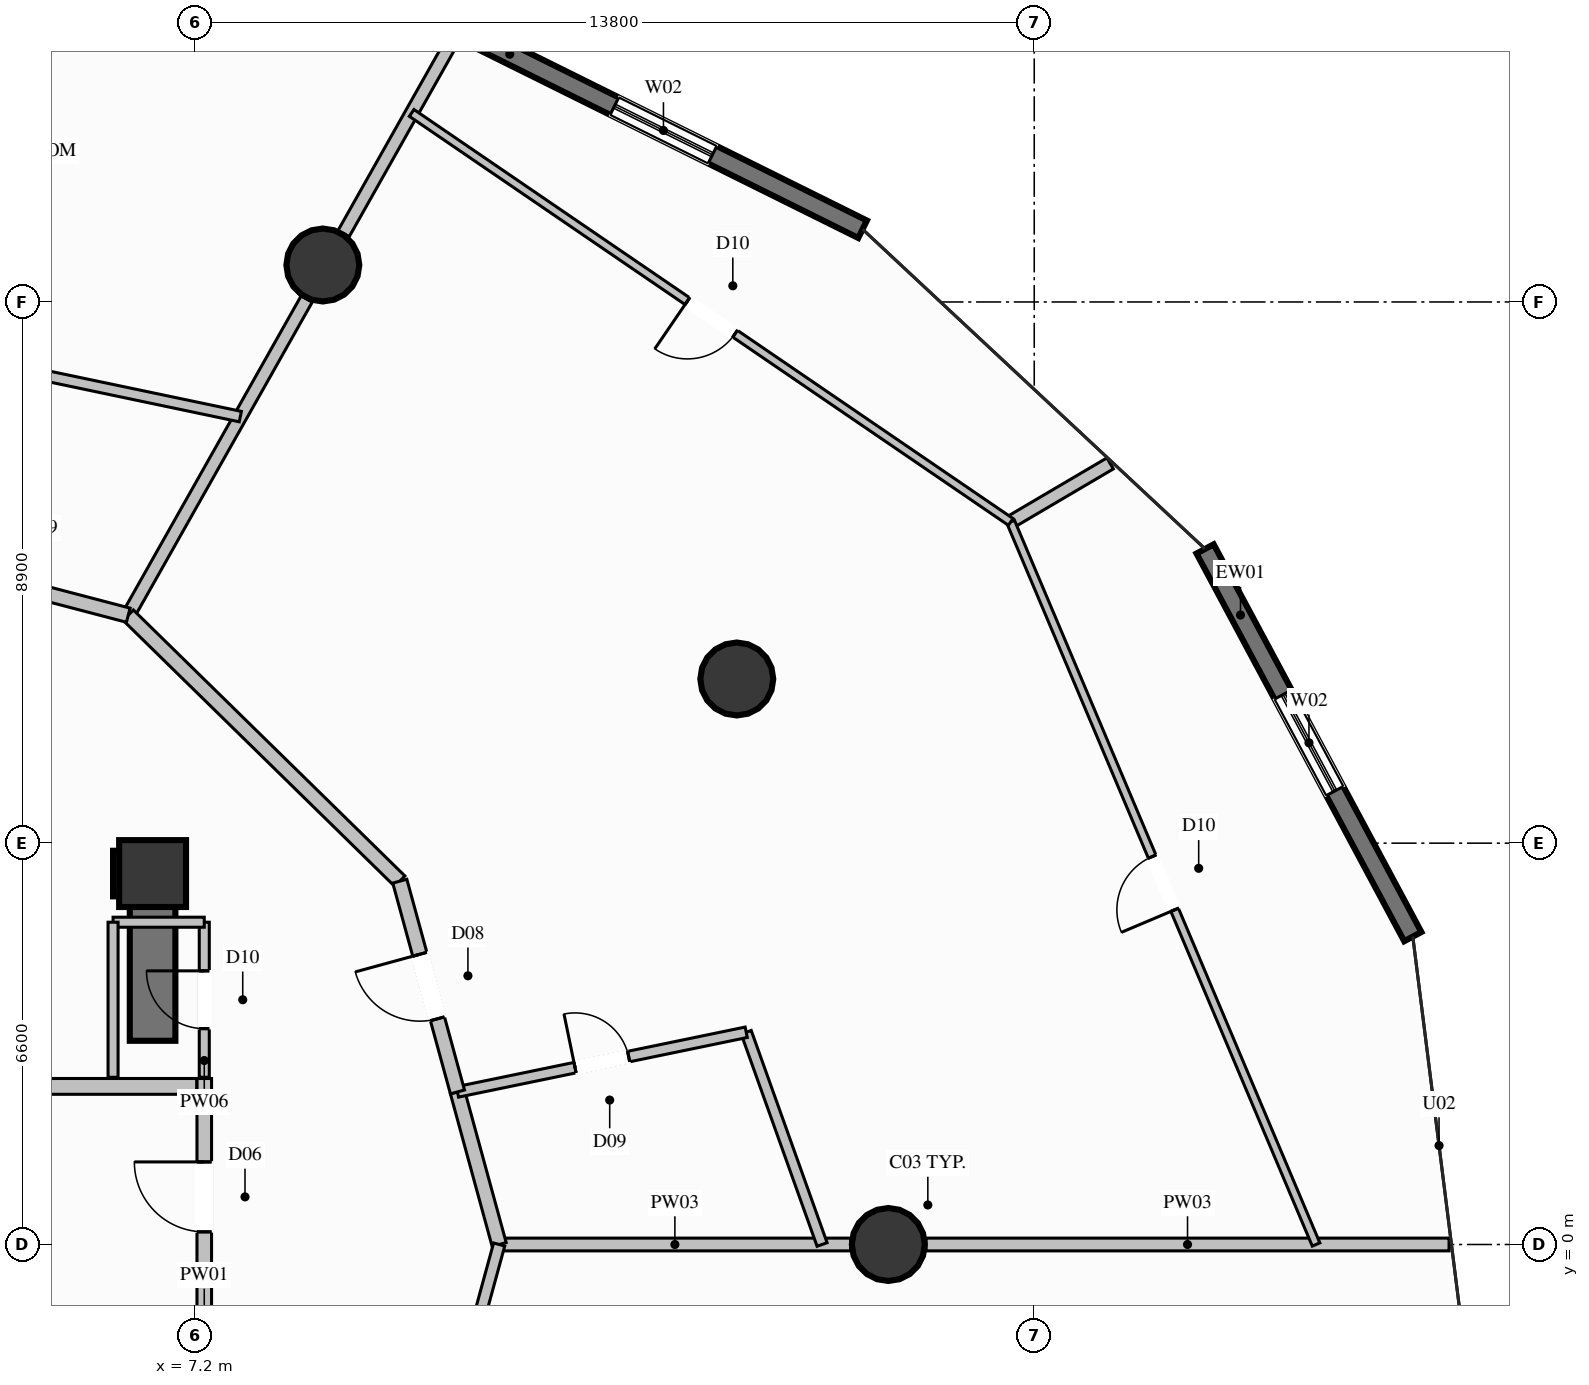
"""IFC4 building model, lengths in metres.
Left out: names, types, materials, properties, quantities, classifications, styles, units other than length and angle.
Written with IfcOpenShell. Run it as: python <this file> out.ifc"""

import sys

from ifc_helpers import new_model, si_unit, direction, frame, frame_2d, origin, origin_2d, place, context, subcontext, project, spatial, rectangle, circle, extrude, element, fill, save


model = new_model("IFC4")
c1 = context("Model", 3, precision=1e-05, world=origin(), true_north=direction((0.0, 1.0)))
c2 = subcontext(c1, "Body", "Model", "MODEL_VIEW")
j1 = project(units=[si_unit("LENGTHUNIT", "METRE"), si_unit("PLANEANGLEUNIT", "RADIAN")], contexts=[c1])
p1 = place(None, origin())
s1 = spatial("IfcSite", under=j1, at=p1, CompositionType="ELEMENT")
p2 = place(p1, origin())
s2 = spatial("IfcBuilding", under=s1, at=p2, CompositionType="ELEMENT")
p3 = place(p2, frame((0.0, 0.0, 32.0)))
s3 = spatial("IfcBuildingStorey", under=s2, at=p3, CompositionType="ELEMENT", Elevation=32.0)
p4 = place(p3, frame((6.5, 6.1, 0.0), z_axis=(0.0, 0.0, 1.0), x_axis=(1.0, 0.0, 0.0)))
e1 = element("IfcColumn", 1, at=p4, inside=s3, PredefinedType="COLUMN", context=c2, shape_type="SweptSolid", body=[
    extrude(rectangle(XDim=1.1, YDim=1.1, at=origin_2d()), origin(), (0.0, 0.0, 1.0), 3.6),
])
p5 = place(p3, frame((5.85, 6.1, 0.0), z_axis=(0.0, 0.0, 1.0), x_axis=(1.0, 0.0, 0.0)))
e2 = element("IfcWall", 2, at=p5, inside=s3, PredefinedType="SHEAR", context=c2, shape_type="SweptSolid", body=[
    extrude(rectangle(XDim=0.275, YDim=0.75, at=frame_2d((0.137, 0.0))), origin(), (0.0, 0.0, 1.0), 3.6),
])
p6 = place(p3, frame((6.5, 3.35, 0.0), z_axis=(0.0, 0.0, 1.0), x_axis=(0.0, 1.0, 0.0)))
e3 = element("IfcWall", 3, at=p6, inside=s3, PredefinedType="SHEAR", context=c2, shape_type="SweptSolid", body=[
    extrude(rectangle(XDim=3.125, YDim=0.75, at=frame_2d((1.562, 0.0))), origin(), (0.0, 0.0, 1.0), 3.6),
])
for number, where, z_axis, x_axis in (
    (4, (18.6, 0.0, 0.0), (0.0, 0.0, 1.0), (1.0, 0.0, 0.0)),
    (5, (16.108, 9.3, 0.0), (0.0, 0.0, 1.0), (1.0, 0.0, 0.0)),
    (6, (9.3, 16.108, 0.0), (0.0, 0.0, 1.0), (1.0, 0.0, 0.0)),
):
    element("IfcColumn", number, at=place(p3, frame(where, z_axis=z_axis, x_axis=x_axis)), inside=s3, PredefinedType="COLUMN", context=c2, shape_type="SweptSolid", body=[
        extrude(circle(Radius=0.6, at=origin_2d()), origin(), (0.0, 0.0, 1.0), 3.6),
    ])
p7 = place(p3, frame((23.81, 11.439, 0.0), z_axis=(0.0, 0.0, 1.0), x_axis=(0.472255130515, -0.881461905985, 0.0)))
e7 = element("IfcWall", 7, at=p7, inside=s3, PredefinedType="SOLIDWALL", context=c2, shape_type="SweptSolid", body=[
    extrude(rectangle(XDim=7.233, YDim=0.32, at=frame_2d((3.617, 0.0))), origin(), (0.0, 0.0, 1.0), 3.34),
])
p8 = place(p7, frame((2.717, 0.0, 0.35)))
e8 = element("IfcOpeningElement", 8, at=p8, cuts=e7, PredefinedType="OPENING", context=c2, shape_type="SweptSolid", body=[
    extrude(rectangle(XDim=1.8, YDim=2.6, at=frame_2d((0.9, 1.3))), frame((0.0, 0.17, 0.0), z_axis=(0.0, -1.0, 0.0), x_axis=(1.0, 0.0, 0.0)), (0.0, 0.0, 1.0), 0.34),
])
p9 = place(p3, frame((10.876, 20.318, 0.0), z_axis=(0.0, 0.0, 1.0), x_axis=(0.895818759339, -0.444419565743, 0.0)))
e9 = element("IfcWall", 9, at=p9, inside=s3, PredefinedType="SOLIDWALL", context=c2, shape_type="SweptSolid", body=[
    extrude(rectangle(XDim=8.15, YDim=0.32, at=frame_2d((4.075, 0.0))), origin(), (0.0, 0.0, 1.0), 3.34),
])
p10 = place(p9, frame((3.594, 0.0, 0.35)))
e10 = element("IfcOpeningElement", 10, at=p10, cuts=e9, PredefinedType="OPENING", context=c2, shape_type="SweptSolid", body=[
    extrude(rectangle(XDim=1.8, YDim=2.6, at=frame_2d((0.9, 1.3))), frame((0.0, 0.17, 0.0), z_axis=(0.0, -1.0, 0.0), x_axis=(1.0, 0.0, 0.0)), (0.0, 0.0, 1.0), 0.34),
])
p11 = place(p3, frame((7.35, -2.34, 0.0), z_axis=(0.0, 0.0, 1.0), x_axis=(0.0, 1.0, 0.0)))
e11 = element("IfcWall", 11, at=p11, inside=s3, PredefinedType="PARTITIONING", context=c2, shape_type="SweptSolid", body=[
    extrude(rectangle(XDim=5.07, YDim=0.24, at=frame_2d((2.535, 0.0))), origin(), (0.0, 0.0, 1.0), 2.425),
])
p12 = place(p11, frame((2.548, 0.0, 0.0)))
e12 = element("IfcOpeningElement", 12, at=p12, cuts=e11, PredefinedType="OPENING", context=c2, shape_type="SweptSolid", body=[
    extrude(rectangle(XDim=1.15, YDim=2.2, at=frame_2d((0.575, 1.1))), frame((0.0, 0.13, 0.0), z_axis=(0.0, -1.0, 0.0), x_axis=(1.0, 0.0, 0.0)), (0.0, 0.0, 1.0), 0.26),
])
p13 = place(p3, frame((4.13, 2.6, 0.0), z_axis=(0.0, 0.0, 1.0), x_axis=(1.0, 0.0, 0.0)))
e13 = element("IfcWall", 13, at=p13, inside=s3, PredefinedType="PARTITIONING", context=c2, shape_type="SweptSolid", body=[
    extrude(rectangle(XDim=3.095, YDim=0.26, at=frame_2d((1.548, 0.0))), origin(), (0.0, 0.0, 1.0), 3.34),
])
p14 = place(p3, frame((7.35, 2.75, 0.0), z_axis=(0.0, 0.0, 1.0), x_axis=(0.0, 1.0, 0.0)))
e14 = element("IfcWall", 14, at=p14, inside=s3, PredefinedType="PARTITIONING", context=c2, shape_type="SweptSolid", body=[
    extrude(rectangle(XDim=2.55, YDim=0.165, at=frame_2d((1.275, 0.0))), origin(), (0.0, 0.0, 1.0), 3.34),
])
p15 = place(p14, frame((0.8, 0.0, 0.0)))
e15 = element("IfcOpeningElement", 15, at=p15, cuts=e14, PredefinedType="OPENING", context=c2, shape_type="SweptSolid", body=[
    extrude(rectangle(XDim=0.95, YDim=2.1, at=frame_2d((0.475, 1.05))), frame((0.0, 0.093, 0.0), z_axis=(0.0, -1.0, 0.0), x_axis=(1.0, 0.0, 0.0)), (0.0, 0.0, 1.0), 0.185),
])
p16 = place(p3, frame((7.35, 5.3, 0.0), z_axis=(0.0, 0.0, 1.0), x_axis=(-1.0, 0.0, 0.0)))
e16 = element("IfcWall", 16, at=p16, inside=s3, PredefinedType="PARTITIONING", context=c2, shape_type="SweptSolid", body=[
    extrude(rectangle(XDim=1.5, YDim=0.165, at=frame_2d((0.75, 0.0))), origin(), (0.0, 0.0, 1.0), 2.425),
])
p17 = place(p3, frame((5.85, 5.3, 0.0), z_axis=(0.0, 0.0, 1.0), x_axis=(0.0, -1.0, 0.0)))
e17 = element("IfcWall", 17, at=p17, inside=s3, PredefinedType="PARTITIONING", context=c2, shape_type="SweptSolid", body=[
    extrude(rectangle(XDim=2.55, YDim=0.165, at=frame_2d((1.275, 0.0))), origin(), (0.0, 0.0, 1.0), 2.425),
])
p18 = place(p3, frame((12.2, 0.0, 0.0), z_axis=(0.0, 0.0, 1.0), x_axis=(1.0, 0.0, 0.0)))
e18 = element("IfcWall", 18, at=p18, inside=s3, PredefinedType="PARTITIONING", context=c2, shape_type="SweptSolid", body=[
    extrude(rectangle(XDim=5.78, YDim=0.21, at=frame_2d((2.89, 0.0))), origin(), (0.0, 0.0, 1.0), 2.709),
])
p19 = place(p3, frame((19.22, 0.0, 0.0), z_axis=(0.0, 0.0, 1.0), x_axis=(1.0, 0.0, 0.0)))
e19 = element("IfcWall", 19, at=p19, inside=s3, PredefinedType="PARTITIONING", context=c2, shape_type="SweptSolid", body=[
    extrude(rectangle(XDim=8.602, YDim=0.21, at=frame_2d((4.301, 0.0))), origin(), (0.0, 0.0, 1.0), 3.34),
])
p20 = place(p3, frame((6.1, 10.349, 0.0), z_axis=(0.0, 0.0, 1.0), x_axis=(0.491458802648, 0.870900824032, 0.0)))
e20 = element("IfcWall", 20, at=p20, inside=s3, PredefinedType="PARTITIONING", context=c2, shape_type="SweptSolid", body=[
    extrude(rectangle(XDim=5.97, YDim=0.21, at=frame_2d((2.985, 0.0))), origin(), (0.0, 0.0, 1.0), 2.709),
])
p21 = place(p3, frame((9.642, 16.625, 0.0), z_axis=(0.0, 0.0, 1.0), x_axis=(0.491316217202, 0.870981271161, 0.0)))
e21 = element("IfcWall", 21, at=p21, inside=s3, PredefinedType="PARTITIONING", context=c2, shape_type="SweptSolid", body=[
    extrude(rectangle(XDim=3.822, YDim=0.21, at=frame_2d((1.911, 0.0))), origin(), (0.0, 0.0, 1.0), 3.34),
])
p22 = place(p3, frame((12.2, 0.0, 0.0), z_axis=(0.0, 0.0, 1.0), x_axis=(-0.263744763784, 0.964592504416, 0.0)))
e22 = element("IfcWall", 22, at=p22, inside=s3, PredefinedType="PARTITIONING", context=c2, shape_type="SweptSolid", body=[
    extrude(rectangle(XDim=2.601, YDim=0.24, at=frame_2d((1.301, 0.0))), origin(), (0.0, 0.0, 1.0), 2.919),
])
p23 = place(p3, frame((17.511, 0.0, 0.0), z_axis=(0.0, 0.0, 1.0), x_axis=(-0.336724431673, 0.94160323763, 0.0)))
e23 = element("IfcWall", 23, at=p23, inside=s3, PredefinedType="PLUMBINGWALL", context=c2, shape_type="SweptSolid", body=[
    extrude(rectangle(XDim=3.707, YDim=0.175, at=frame_2d((1.853, 0.0))), origin(), (0.0, 0.0, 1.0), 3.34),
])
p24 = place(p3, frame((11.514, 2.509, 0.0), z_axis=(0.0, 0.0, 1.0), x_axis=(0.979325812174, 0.202289281992, 0.0)))
e24 = element("IfcWall", 24, at=p24, inside=s3, PredefinedType="PLUMBINGWALL", context=c2, shape_type="SweptSolid", body=[
    extrude(rectangle(XDim=4.849, YDim=0.175, at=frame_2d((2.425, 0.0))), origin(), (0.0, 0.0, 1.0), 3.34),
])
p25 = place(p24, frame((1.975, 0.0, 0.0)))
e25 = element("IfcOpeningElement", 25, at=p25, cuts=e24, PredefinedType="OPENING", context=c2, shape_type="SweptSolid", body=[
    extrude(rectangle(XDim=0.9, YDim=2.1, at=frame_2d((0.45, 1.05))), frame((0.0, 0.098, 0.0), z_axis=(0.0, -1.0, 0.0), x_axis=(1.0, 0.0, 0.0)), (0.0, 0.0, 1.0), 0.195),
])
p26 = place(p3, frame((20.613, 11.883, 0.0), z_axis=(0.0, 0.0, 1.0), x_axis=(0.861901128596, 0.507076369519, 0.0)))
e26 = element("IfcWall", 26, at=p26, inside=s3, PredefinedType="PARTITIONING", context=c2, shape_type="SweptSolid", body=[
    extrude(rectangle(XDim=1.897, YDim=0.21, at=frame_2d((0.948, 0.0))), origin(), (0.0, 0.0, 1.0), 3.34),
])
p27 = place(p3, frame((10.566, 5.975, 0.0), z_axis=(0.0, 0.0, 1.0), x_axis=(-0.714411174131, 0.699726142342, 0.0)))
e27 = element("IfcWall", 27, at=p27, inside=s3, PredefinedType="PARTITIONING", context=c2, shape_type="SweptSolid", body=[
    extrude(rectangle(XDim=6.251, YDim=0.24, at=frame_2d((3.125, 0.0))), origin(), (0.0, 0.0, 1.0), 3.34),
])
p28 = place(p3, frame((11.514, 2.509, 0.0), z_axis=(0.0, 0.0, 1.0), x_axis=(-0.263818706543, 0.96457228349, 0.0)))
e28 = element("IfcWall", 28, at=p28, inside=s3, PredefinedType="PARTITIONING", context=c2, shape_type="SweptSolid", body=[
    extrude(rectangle(XDim=3.593, YDim=0.24, at=frame_2d((1.797, 0.0))), origin(), (0.0, 0.0, 1.0), 2.919),
])
p29 = place(p28, frame((1.247, 0.0, 0.0)))
e29 = element("IfcOpeningElement", 29, at=p29, cuts=e28, PredefinedType="OPENING", context=c2, shape_type="SweptSolid", body=[
    extrude(rectangle(XDim=1.1, YDim=2.3, at=frame_2d((0.55, 1.15))), frame((0.0, 0.13, 0.0), z_axis=(0.0, -1.0, 0.0), x_axis=(1.0, 0.0, 0.0)), (0.0, 0.0, 1.0), 0.26),
])
p30 = place(p3, frame((25.635, 0.0, 0.0), z_axis=(0.0, 0.0, 1.0), x_axis=(-0.389280036571, 0.921119456491, 0.0)))
e30 = element("IfcWall", 30, at=p30, inside=s3, PredefinedType="PARTITIONING", context=c2, shape_type="SweptSolid", body=[
    extrude(rectangle(XDim=12.901, YDim=0.135, at=frame_2d((6.45, 0.0))), origin(), (0.0, 0.0, 1.0), 3.34),
])
p31 = place(p30, frame((5.975, 0.0, 0.0)))
e31 = element("IfcOpeningElement", 31, at=p31, cuts=e30, PredefinedType="OPENING", context=c2, shape_type="SweptSolid", body=[
    extrude(rectangle(XDim=0.95, YDim=2.1, at=frame_2d((0.475, 1.05))), frame((0.0, 0.078, 0.0), z_axis=(0.0, -1.0, 0.0), x_axis=(1.0, 0.0, 0.0)), (0.0, 0.0, 1.0), 0.155),
])
p32 = place(p3, frame((20.613, 11.883, 0.0), z_axis=(0.0, 0.0, 1.0), x_axis=(-0.825894658533, 0.563824452295, 0.0)))
e32 = element("IfcWall", 32, at=p32, inside=s3, PredefinedType="PARTITIONING", context=c2, shape_type="SweptSolid", body=[
    extrude(rectangle(XDim=11.929, YDim=0.135, at=frame_2d((5.964, 0.0))), origin(), (0.0, 0.0, 1.0), 3.34),
])
p33 = place(p32, frame((5.489, 0.0, 0.0)))
e33 = element("IfcOpeningElement", 33, at=p33, cuts=e32, PredefinedType="OPENING", context=c2, shape_type="SweptSolid", body=[
    extrude(rectangle(XDim=0.95, YDim=2.1, at=frame_2d((0.475, 1.05))), frame((0.0, 0.078, 0.0), z_axis=(0.0, -1.0, 0.0), x_axis=(1.0, 0.0, 0.0)), (0.0, 0.0, 1.0), 0.155),
])
p34 = place(p3, frame((6.1, 10.349, 0.0), z_axis=(0.0, 0.0, 1.0), x_axis=(-0.967291490053, 0.253667446219, 0.0)))
e34 = element("IfcWall", 34, at=p34, inside=s3, PredefinedType="PARTITIONING", context=c2, shape_type="SweptSolid", body=[
    extrude(rectangle(XDim=2.649, YDim=0.24, at=frame_2d((1.324, 0.0))), origin(), (0.0, 0.0, 1.0), 3.34),
])
p35 = place(p3, frame((7.943, 13.615, 0.0), z_axis=(0.0, 0.0, 1.0), x_axis=(-0.978691652986, 0.205335453283, 0.0)))
e35 = element("IfcWall", 35, at=p35, inside=s3, PredefinedType="PLUMBINGWALL", context=c2, shape_type="SweptSolid", body=[
    extrude(rectangle(XDim=3.409, YDim=0.175, at=frame_2d((1.705, 0.0))), origin(), (0.0, 0.0, 1.0), 3.34),
])
p36 = place(p3, frame((10.566, -5.975, 0.0), z_axis=(0.0, 0.0, 1.0), x_axis=(0.263787657435, 0.964580775148, 0.0)))
e36 = element("IfcWall", 36, at=p36, inside=s3, PredefinedType="PARTITIONING", context=c2, shape_type="SweptSolid", body=[
    extrude(rectangle(XDim=6.195, YDim=0.19, at=frame_2d((3.097, 0.0))), origin(), (0.0, 0.0, 1.0), 2.919),
])
p37 = place(p36, frame((2.622, 0.0, 0.0)))
e37 = element("IfcOpeningElement", 37, at=p37, cuts=e36, PredefinedType="OPENING", context=c2, shape_type="SweptSolid", body=[
    extrude(rectangle(XDim=0.95, YDim=2.1, at=frame_2d((0.475, 1.05))), frame((0.0, 0.105, 0.0), z_axis=(0.0, -1.0, 0.0), x_axis=(1.0, 0.0, 0.0)), (0.0, 0.0, 1.0), 0.21),
])
p38 = place(p8, origin())
e38 = element("IfcWindow", 38, at=p38, inside=s3, PartitioningType="SINGLE_PANEL", PredefinedType="WINDOW", context=c2, shape_type="SweptSolid", body=[
    extrude(rectangle(XDim=1.8, YDim=2.6, at=frame_2d((0.9, 1.3))), frame((0.0, 0.03, 0.0), z_axis=(0.0, -1.0, 0.0), x_axis=(1.0, 0.0, 0.0)), (0.0, 0.0, 1.0), 0.06),
])
fill(e8, e38)
p39 = place(p10, origin())
e39 = element("IfcWindow", 39, at=p39, inside=s3, PartitioningType="SINGLE_PANEL", PredefinedType="WINDOW", context=c2, shape_type="SweptSolid", body=[
    extrude(rectangle(XDim=1.8, YDim=2.6, at=frame_2d((0.9, 1.3))), frame((0.0, 0.03, 0.0), z_axis=(0.0, -1.0, 0.0), x_axis=(1.0, 0.0, 0.0)), (0.0, 0.0, 1.0), 0.06),
])
fill(e10, e39)
p40 = place(p12, origin())
e40 = element("IfcDoor", 40, at=p40, inside=s3, OperationType="SINGLE_SWING_RIGHT", PredefinedType="DOOR", context=c2, shape_type="SweptSolid", body=[
    extrude(rectangle(XDim=1.15, YDim=2.2, at=frame_2d((0.575, 1.1))), frame((0.0, 0.025, 0.0), z_axis=(0.0, -1.0, 0.0), x_axis=(1.0, 0.0, 0.0)), (0.0, 0.0, 1.0), 0.05),
])
fill(e12, e40)
p41 = place(p15, origin())
e41 = element("IfcDoor", 41, at=p41, inside=s3, OperationType="SINGLE_SWING_RIGHT", PredefinedType="DOOR", context=c2, shape_type="SweptSolid", body=[
    extrude(rectangle(XDim=0.95, YDim=2.1, at=frame_2d((0.475, 1.05))), frame((0.0, 0.025, 0.0), z_axis=(0.0, -1.0, 0.0), x_axis=(1.0, 0.0, 0.0)), (0.0, 0.0, 1.0), 0.05),
])
fill(e15, e41)
p42 = place(p25, origin())
e42 = element("IfcDoor", 42, at=p42, inside=s3, OperationType="SINGLE_SWING_LEFT", PredefinedType="DOOR", context=c2, shape_type="SweptSolid", body=[
    extrude(rectangle(XDim=0.9, YDim=2.1, at=frame_2d((0.45, 1.05))), frame((0.0, 0.025, 0.0), z_axis=(0.0, -1.0, 0.0), x_axis=(1.0, 0.0, 0.0)), (0.0, 0.0, 1.0), 0.05),
])
fill(e25, e42)
p43 = place(p29, origin())
e43 = element("IfcDoor", 43, at=p43, inside=s3, OperationType="SINGLE_SWING_RIGHT", PredefinedType="DOOR", context=c2, shape_type="SweptSolid", body=[
    extrude(rectangle(XDim=1.1, YDim=2.3, at=frame_2d((0.55, 1.15))), frame((0.0, 0.025, 0.0), z_axis=(0.0, -1.0, 0.0), x_axis=(1.0, 0.0, 0.0)), (0.0, 0.0, 1.0), 0.05),
])
fill(e29, e43)
p44 = place(p31, origin())
e44 = element("IfcDoor", 44, at=p44, inside=s3, OperationType="SINGLE_SWING_LEFT", PredefinedType="DOOR", context=c2, shape_type="SweptSolid", body=[
    extrude(rectangle(XDim=0.95, YDim=2.1, at=frame_2d((0.475, 1.05))), frame((0.0, 0.025, 0.0), z_axis=(0.0, -1.0, 0.0), x_axis=(1.0, 0.0, 0.0)), (0.0, 0.0, 1.0), 0.05),
])
fill(e31, e44)
p45 = place(p33, origin())
e45 = element("IfcDoor", 45, at=p45, inside=s3, OperationType="SINGLE_SWING_RIGHT", PredefinedType="DOOR", context=c2, shape_type="SweptSolid", body=[
    extrude(rectangle(XDim=0.95, YDim=2.1, at=frame_2d((0.475, 1.05))), frame((0.0, 0.025, 0.0), z_axis=(0.0, -1.0, 0.0), x_axis=(1.0, 0.0, 0.0)), (0.0, 0.0, 1.0), 0.05),
])
fill(e33, e45)
save(model, sys.argv[1])
